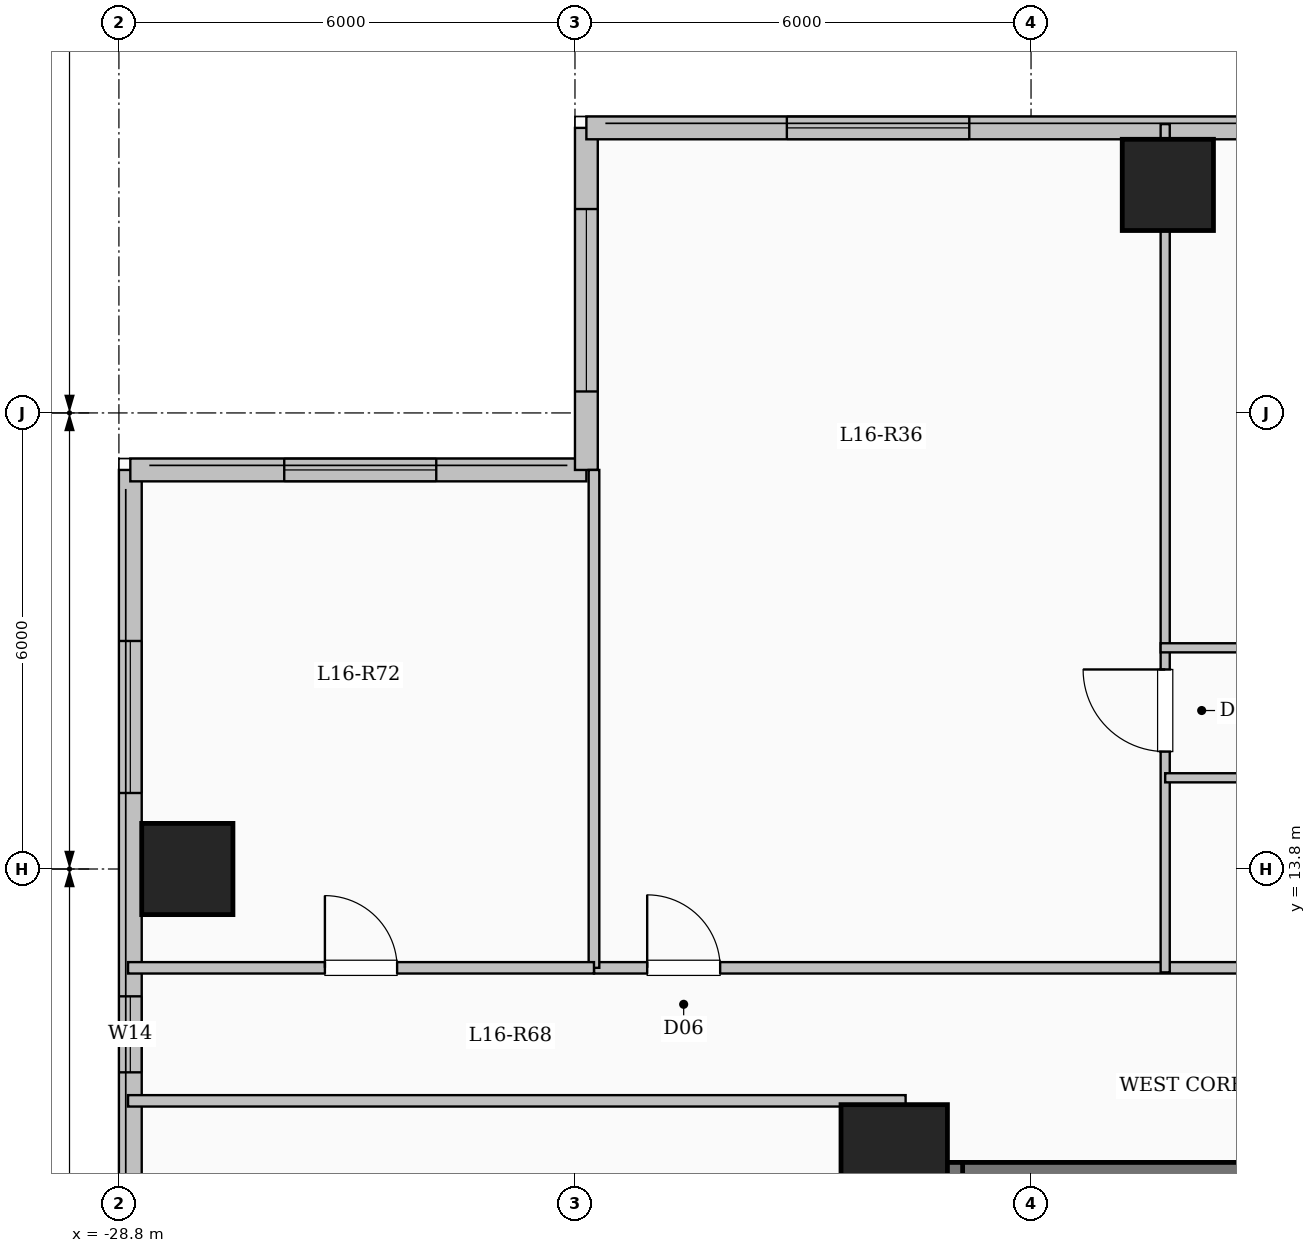
"""IFC4 building model, lengths in metres.
Left out: names, types, materials, properties, quantities, classifications, styles, units other than length and angle.
Written with IfcOpenShell. Run it as: python <this file> out.ifc"""

import sys

from ifc_helpers import new_model, si_unit, direction, frame, frame_2d, origin, origin_2d, place, context, subcontext, project, spatial, rectangle, extrude, element, fill, save


model = new_model("IFC4")
c1 = context("Model", 3, precision=1e-05, world=origin(), true_north=direction((0.0, 1.0)))
c2 = subcontext(c1, "Body", "Model", "MODEL_VIEW")
j1 = project(units=[si_unit("LENGTHUNIT", "METRE"), si_unit("PLANEANGLEUNIT", "RADIAN")], contexts=[c1])
p1 = place(None, origin())
s1 = spatial("IfcSite", under=j1, at=p1, CompositionType="ELEMENT")
p2 = place(p1, origin())
s2 = spatial("IfcBuilding", under=s1, at=p2, CompositionType="ELEMENT")
p3 = place(p2, frame((0.0, 0.0, 60.85)))
s3 = spatial("IfcBuildingStorey", under=s2, at=p3, CompositionType="ELEMENT", Elevation=60.85)
p4 = place(p3, frame((-18.6, 10.0, 0.0), z_axis=(0.0, 0.0, 1.0), x_axis=(1.0, 0.0, 0.0)))
e1 = element("IfcColumn", 1, at=p4, inside=s3, PredefinedType="COLUMN", context=c2, shape_type="SweptSolid", body=[
    extrude(rectangle(XDim=1.4, YDim=1.4, at=origin_2d()), origin(), (0.0, 0.0, 1.0), 3.35),
])
for number, where, z_axis, x_axis in (
    (2, (-15.0, 22.8, 0.0), (0.0, 0.0, 1.0), (1.0, 0.0, 0.0)),
    (3, (-27.9, 13.8, 0.0), (0.0, 0.0, 1.0), (1.0, 0.0, 0.0)),
):
    element("IfcColumn", number, at=place(p3, frame(where, z_axis=z_axis, x_axis=x_axis)), inside=s3, PredefinedType="COLUMN", context=c2, shape_type="SweptSolid", body=[
        extrude(rectangle(XDim=1.2, YDim=1.2, at=origin_2d()), origin(), (0.0, 0.0, 1.0), 3.35),
    ])
p5 = place(p3, frame((-28.65, -19.05, 0.0), z_axis=(0.0, 0.0, 1.0), x_axis=(0.0, 1.0, 0.0)))
e4 = element("IfcWall", 4, at=p5, inside=s3, PredefinedType="SOLIDWALL", context=c2, shape_type="SweptSolid", body=[
    extrude(rectangle(XDim=38.1, YDim=0.3, at=frame_2d((19.05, 0.0))), origin(), (0.0, 0.0, 1.0), 3.05),
])
p6 = place(p5, frame((3.15, 0.0, 0.9)))
e5 = element("IfcOpeningElement", 5, at=p6, cuts=e4, PredefinedType="OPENING", context=c2, shape_type="SweptSolid", body=[
    extrude(rectangle(XDim=2.4, YDim=1.8, at=frame_2d((1.2, 0.9))), frame((0.0, 0.16, 0.0), z_axis=(0.0, -1.0, 0.0), x_axis=(1.0, 0.0, 0.0)), (0.0, 0.0, 1.0), 0.32),
])
p7 = place(p5, frame((9.542, 0.0, 0.9)))
e6 = element("IfcOpeningElement", 6, at=p7, cuts=e4, PredefinedType="OPENING", context=c2, shape_type="SweptSolid", body=[
    extrude(rectangle(XDim=1.5, YDim=1.65, at=frame_2d((0.75, 0.825))), frame((0.0, 0.16, 0.0), z_axis=(0.0, -1.0, 0.0), x_axis=(1.0, 0.0, 0.0)), (0.0, 0.0, 1.0), 0.32),
])
p8 = place(p5, frame((19.8, 0.0, 0.9)))
e7 = element("IfcOpeningElement", 7, at=p8, cuts=e4, PredefinedType="OPENING", context=c2, shape_type="SweptSolid", body=[
    extrude(rectangle(XDim=2.0, YDim=1.7, at=frame_2d((1.0, 0.85))), frame((0.0, 0.16, 0.0), z_axis=(0.0, -1.0, 0.0), x_axis=(1.0, 0.0, 0.0)), (0.0, 0.0, 1.0), 0.32),
])
p9 = place(p5, frame((30.175, 0.0, 0.95)))
e8 = element("IfcOpeningElement", 8, at=p9, cuts=e4, PredefinedType="OPENING", context=c2, shape_type="SweptSolid", body=[
    extrude(rectangle(XDim=1.0, YDim=1.5, at=frame_2d((0.5, 0.75))), frame((0.0, 0.16, 0.0), z_axis=(0.0, -1.0, 0.0), x_axis=(1.0, 0.0, 0.0)), (0.0, 0.0, 1.0), 0.32),
])
p10 = place(p5, frame((33.85, 0.0, 0.9)))
e9 = element("IfcOpeningElement", 9, at=p10, cuts=e4, PredefinedType="OPENING", context=c2, shape_type="SweptSolid", body=[
    extrude(rectangle(XDim=2.0, YDim=1.7, at=frame_2d((1.0, 0.85))), frame((0.0, 0.16, 0.0), z_axis=(0.0, -1.0, 0.0), x_axis=(1.0, 0.0, 0.0)), (0.0, 0.0, 1.0), 0.32),
])
p11 = place(p3, frame((-28.65, 19.05, 0.0), z_axis=(0.0, 0.0, 1.0), x_axis=(1.0, 0.0, 0.0)))
e10 = element("IfcWall", 10, at=p11, inside=s3, PredefinedType="SOLIDWALL", context=c2, shape_type="SweptSolid", body=[
    extrude(rectangle(XDim=6.0, YDim=0.3, at=frame_2d((3.0, 0.0))), origin(), (0.0, 0.0, 1.0), 3.05),
])
p12 = place(p11, frame((2.025, 0.0, 0.9)))
e11 = element("IfcOpeningElement", 11, at=p12, cuts=e10, PredefinedType="OPENING", context=c2, shape_type="SweptSolid", body=[
    extrude(rectangle(XDim=2.0, YDim=1.7, at=frame_2d((1.0, 0.85))), frame((0.0, 0.16, 0.0), z_axis=(0.0, -1.0, 0.0), x_axis=(1.0, 0.0, 0.0)), (0.0, 0.0, 1.0), 0.32),
])
p13 = place(p3, frame((-22.65, 19.05, 0.0), z_axis=(0.0, 0.0, 1.0), x_axis=(0.0, 1.0, 0.0)))
e12 = element("IfcWall", 12, at=p13, inside=s3, PredefinedType="SOLIDWALL", context=c2, shape_type="SweptSolid", body=[
    extrude(rectangle(XDim=4.5, YDim=0.3, at=frame_2d((2.25, 0.0))), origin(), (0.0, 0.0, 1.0), 3.05),
])
p14 = place(p13, frame((1.032, 0.0, 0.9)))
e13 = element("IfcOpeningElement", 13, at=p14, cuts=e12, PredefinedType="OPENING", context=c2, shape_type="SweptSolid", body=[
    extrude(rectangle(XDim=2.4, YDim=1.8, at=frame_2d((1.2, 0.9))), frame((0.0, 0.16, 0.0), z_axis=(0.0, -1.0, 0.0), x_axis=(1.0, 0.0, 0.0)), (0.0, 0.0, 1.0), 0.32),
])
p15 = place(p3, frame((-22.65, 23.55, 0.0), z_axis=(0.0, 0.0, 1.0), x_axis=(1.0, 0.0, 0.0)))
e14 = element("IfcWall", 14, at=p15, inside=s3, PredefinedType="SOLIDWALL", context=c2, shape_type="SweptSolid", body=[
    extrude(rectangle(XDim=15.3, YDim=0.3, at=frame_2d((7.65, 0.0))), origin(), (0.0, 0.0, 1.0), 3.05),
])
p16 = place(p15, frame((2.637, 0.0, 0.9)))
e15 = element("IfcOpeningElement", 15, at=p16, cuts=e14, PredefinedType="OPENING", context=c2, shape_type="SweptSolid", body=[
    extrude(rectangle(XDim=2.4, YDim=1.8, at=frame_2d((1.2, 0.9))), frame((0.0, 0.16, 0.0), z_axis=(0.0, -1.0, 0.0), x_axis=(1.0, 0.0, 0.0)), (0.0, 0.0, 1.0), 0.32),
])
p17 = place(p15, frame((8.656, 0.0, 0.9)))
e16 = element("IfcOpeningElement", 16, at=p17, cuts=e14, PredefinedType="OPENING", context=c2, shape_type="SweptSolid", body=[
    extrude(rectangle(XDim=1.8, YDim=1.65, at=frame_2d((0.9, 0.825))), frame((0.0, 0.16, 0.0), z_axis=(0.0, -1.0, 0.0), x_axis=(1.0, 0.0, 0.0)), (0.0, 0.0, 1.0), 0.32),
])
p18 = place(p15, frame((12.544, 0.0, 0.9)))
e17 = element("IfcOpeningElement", 17, at=p18, cuts=e14, PredefinedType="OPENING", context=c2, shape_type="SweptSolid", body=[
    extrude(rectangle(XDim=1.8, YDim=1.65, at=frame_2d((0.9, 0.825))), frame((0.0, 0.16, 0.0), z_axis=(0.0, -1.0, 0.0), x_axis=(1.0, 0.0, 0.0)), (0.0, 0.0, 1.0), 0.32),
])
p19 = place(p3, frame((-18.0, 9.79, 0.0), z_axis=(0.0, 0.0, 1.0), x_axis=(1.0, 0.0, 0.0)))
e18 = element("IfcWall", 18, at=p19, inside=s3, PredefinedType="SHEAR", context=c2, shape_type="SweptSolid", body=[
    extrude(rectangle(XDim=8.0, YDim=0.3, at=frame_2d((4.0, 0.0))), origin(), (0.0, 0.0, 1.0), 3.35),
])
p20 = place(p3, frame((-17.85, 6.35, 0.0), z_axis=(0.0, 0.0, 1.0), x_axis=(0.0, 1.0, 0.0)))
e19 = element("IfcWall", 19, at=p20, inside=s3, PredefinedType="SHEAR", context=c2, shape_type="SweptSolid", body=[
    extrude(rectangle(XDim=3.59, YDim=0.3, at=frame_2d((1.795, 0.0))), origin(), (0.0, 0.0, 1.0), 3.35),
])
p21 = place(p3, frame((-22.55, 12.5, 0.0), z_axis=(0.0, 0.0, 1.0), x_axis=(1.0, 0.0, 0.0)))
e20 = element("IfcWall", 20, at=p21, inside=s3, PredefinedType="PARTITIONING", context=c2, shape_type="SweptSolid", body=[
    extrude(rectangle(XDim=18.7, YDim=0.15, at=frame_2d((9.35, 0.0))), origin(), (0.0, 0.0, 1.0), 3.05),
])
p22 = place(p21, frame((0.7, 0.0, 0.0)))
e21 = element("IfcOpeningElement", 21, at=p22, cuts=e20, PredefinedType="OPENING", context=c2, shape_type="SweptSolid", body=[
    extrude(rectangle(XDim=0.96, YDim=2.15, at=frame_2d((0.48, 1.075))), frame((0.0, 0.085, 0.0), z_axis=(0.0, -1.0, 0.0), x_axis=(1.0, 0.0, 0.0)), (0.0, 0.0, 1.0), 0.17),
])
p23 = place(p3, frame((-15.035, 12.44, 0.0), z_axis=(0.0, 0.0, 1.0), x_axis=(0.0, 1.0, 0.0)))
e22 = element("IfcWall", 22, at=p23, inside=s3, PredefinedType="PARTITIONING", context=c2, shape_type="SweptSolid", body=[
    extrude(rectangle(XDim=11.16, YDim=0.12, at=frame_2d((5.58, 0.0))), origin(), (0.0, 0.0, 1.0), 2.385),
])
p24 = place(p23, frame((2.905, 0.0, 0.0)))
e23 = element("IfcOpeningElement", 23, at=p24, cuts=e22, PredefinedType="OPENING", context=c2, shape_type="SweptSolid", body=[
    extrude(rectangle(XDim=1.08, YDim=2.15, at=frame_2d((0.54, 1.075))), frame((0.0, 0.07, 0.0), z_axis=(0.0, -1.0, 0.0), x_axis=(1.0, 0.0, 0.0)), (0.0, 0.0, 1.0), 0.14),
])
p25 = place(p3, frame((-15.035, 15.0, 0.0), z_axis=(0.0, 0.0, 1.0), x_axis=(1.0, 0.0, 0.0)))
e24 = element("IfcWall", 24, at=p25, inside=s3, PredefinedType="PARTITIONING", context=c2, shape_type="SweptSolid", body=[
    extrude(rectangle(XDim=8.228, YDim=0.12, at=frame_2d((4.114, 0.0))), origin(), (0.0, 0.0, 1.0), 2.535),
])
p26 = place(p25, frame((3.674, 0.0, 0.0)))
e25 = element("IfcOpeningElement", 25, at=p26, cuts=e24, PredefinedType="OPENING", context=c2, shape_type="SweptSolid", body=[
    extrude(rectangle(XDim=0.88, YDim=2.1, at=frame_2d((0.44, 1.05))), frame((0.0, 0.07, 0.0), z_axis=(0.0, -1.0, 0.0), x_axis=(1.0, 0.0, 0.0)), (0.0, 0.0, 1.0), 0.14),
])
p27 = place(p3, frame((-15.095, 16.71, 0.0), z_axis=(0.0, 0.0, 1.0), x_axis=(1.0, 0.0, 0.0)))
e26 = element("IfcWall", 26, at=p27, inside=s3, PredefinedType="PARTITIONING", context=c2, shape_type="SweptSolid", body=[
    extrude(rectangle(XDim=15.705, YDim=0.12, at=frame_2d((7.853, 0.0))), origin(), (0.0, 0.0, 1.0), 2.535),
])
p28 = place(p27, frame((1.501, 0.0, 0.0)))
e27 = element("IfcOpeningElement", 27, at=p28, cuts=e26, PredefinedType="OPENING", context=c2, shape_type="SweptSolid", body=[
    extrude(rectangle(XDim=0.88, YDim=2.1, at=frame_2d((0.44, 1.05))), frame((0.0, 0.07, 0.0), z_axis=(0.0, -1.0, 0.0), x_axis=(1.0, 0.0, 0.0)), (0.0, 0.0, 1.0), 0.14),
])
p29 = place(p27, frame((5.382, 0.0, 0.0)))
e28 = element("IfcOpeningElement", 28, at=p29, cuts=e26, PredefinedType="OPENING", context=c2, shape_type="SweptSolid", body=[
    extrude(rectangle(XDim=0.88, YDim=2.1, at=frame_2d((0.44, 1.05))), frame((0.0, 0.07, 0.0), z_axis=(0.0, -1.0, 0.0), x_axis=(1.0, 0.0, 0.0)), (0.0, 0.0, 1.0), 0.14),
])
p30 = place(p27, frame((9.263, 0.0, 0.0)))
e29 = element("IfcOpeningElement", 29, at=p30, cuts=e26, PredefinedType="OPENING", context=c2, shape_type="SweptSolid", body=[
    extrude(rectangle(XDim=0.88, YDim=2.1, at=frame_2d((0.44, 1.05))), frame((0.0, 0.07, 0.0), z_axis=(0.0, -1.0, 0.0), x_axis=(1.0, 0.0, 0.0)), (0.0, 0.0, 1.0), 0.14),
])
p31 = place(p27, frame((13.144, 0.0, 0.0)))
e30 = element("IfcOpeningElement", 30, at=p31, cuts=e26, PredefinedType="OPENING", context=c2, shape_type="SweptSolid", body=[
    extrude(rectangle(XDim=0.88, YDim=2.1, at=frame_2d((0.44, 1.05))), frame((0.0, 0.07, 0.0), z_axis=(0.0, -1.0, 0.0), x_axis=(1.0, 0.0, 0.0)), (0.0, 0.0, 1.0), 0.14),
])
p32 = place(p3, frame((-28.68, 10.75, 0.0), z_axis=(0.0, 0.0, 1.0), x_axis=(1.0, 0.0, 0.0)))
e31 = element("IfcWall", 31, at=p32, inside=s3, PredefinedType="PARTITIONING", context=c2, shape_type="SweptSolid", body=[
    extrude(rectangle(XDim=10.23, YDim=0.15, at=frame_2d((5.115, 0.0))), origin(), (0.0, 0.0, 1.0), 3.05),
])
p33 = place(p3, frame((-22.55, 12.5, 0.0), z_axis=(0.0, 0.0, 1.0), x_axis=(0.0, 1.0, 0.0)))
e32 = element("IfcWall", 32, at=p33, inside=s3, PredefinedType="PARTITIONING", context=c2, shape_type="SweptSolid", body=[
    extrude(rectangle(XDim=6.55, YDim=0.14, at=frame_2d((3.275, 0.0))), origin(), (0.0, 0.0, 1.0), 3.05),
])
p34 = place(p3, frame((-28.68, 12.5, 0.0), z_axis=(0.0, 0.0, 1.0), x_axis=(1.0, 0.0, 0.0)))
e33 = element("IfcWall", 33, at=p34, inside=s3, PredefinedType="PARTITIONING", context=c2, shape_type="SweptSolid", body=[
    extrude(rectangle(XDim=6.13, YDim=0.15, at=frame_2d((3.065, 0.0))), origin(), (0.0, 0.0, 1.0), 3.05),
])
p35 = place(p34, frame((2.59, 0.0, 0.0)))
e34 = element("IfcOpeningElement", 34, at=p35, cuts=e33, PredefinedType="OPENING", context=c2, shape_type="SweptSolid", body=[
    extrude(rectangle(XDim=0.95, YDim=2.15, at=frame_2d((0.475, 1.075))), frame((0.0, 0.085, 0.0), z_axis=(0.0, -1.0, 0.0), x_axis=(1.0, 0.0, 0.0)), (0.0, 0.0, 1.0), 0.17),
])
p36 = place(p9, origin())
e35 = element("IfcWindow", 35, at=p36, inside=s3, PartitioningType="SINGLE_PANEL", PredefinedType="WINDOW", context=c2, shape_type="SweptSolid", body=[
    extrude(rectangle(XDim=1.0, YDim=1.5, at=frame_2d((0.5, 0.75))), frame((0.0, 0.03, 0.0), z_axis=(0.0, -1.0, 0.0), x_axis=(1.0, 0.0, 0.0)), (0.0, 0.0, 1.0), 0.06),
])
fill(e8, e35)
p37 = place(p10, origin())
e36 = element("IfcWindow", 36, at=p37, inside=s3, PartitioningType="SINGLE_PANEL", PredefinedType="WINDOW", context=c2, shape_type="SweptSolid", body=[
    extrude(rectangle(XDim=2.0, YDim=1.7, at=frame_2d((1.0, 0.85))), frame((0.0, 0.03, 0.0), z_axis=(0.0, -1.0, 0.0), x_axis=(1.0, 0.0, 0.0)), (0.0, 0.0, 1.0), 0.06),
])
fill(e9, e36)
p38 = place(p12, origin())
e37 = element("IfcWindow", 37, at=p38, inside=s3, PartitioningType="SINGLE_PANEL", PredefinedType="WINDOW", context=c2, shape_type="SweptSolid", body=[
    extrude(rectangle(XDim=2.0, YDim=1.7, at=frame_2d((1.0, 0.85))), frame((0.0, 0.03, 0.0), z_axis=(0.0, -1.0, 0.0), x_axis=(1.0, 0.0, 0.0)), (0.0, 0.0, 1.0), 0.06),
])
fill(e11, e37)
p39 = place(p14, origin())
e38 = element("IfcWindow", 38, at=p39, inside=s3, PartitioningType="SINGLE_PANEL", PredefinedType="WINDOW", context=c2, shape_type="SweptSolid", body=[
    extrude(rectangle(XDim=2.4, YDim=1.8, at=frame_2d((1.2, 0.9))), frame((0.0, 0.03, 0.0), z_axis=(0.0, -1.0, 0.0), x_axis=(1.0, 0.0, 0.0)), (0.0, 0.0, 1.0), 0.06),
])
fill(e13, e38)
p40 = place(p16, origin())
e39 = element("IfcWindow", 39, at=p40, inside=s3, PartitioningType="SINGLE_PANEL", PredefinedType="WINDOW", context=c2, shape_type="SweptSolid", body=[
    extrude(rectangle(XDim=2.4, YDim=1.8, at=frame_2d((1.2, 0.9))), frame((0.0, 0.03, 0.0), z_axis=(0.0, -1.0, 0.0), x_axis=(1.0, 0.0, 0.0)), (0.0, 0.0, 1.0), 0.06),
])
fill(e15, e39)
p41 = place(p22, origin())
e40 = element("IfcDoor", 40, at=p41, inside=s3, OperationType="SINGLE_SWING_LEFT", PredefinedType="DOOR", context=c2, shape_type="SweptSolid", body=[
    extrude(rectangle(XDim=0.96, YDim=2.15, at=frame_2d((0.48, 1.075))), frame((0.0, 0.025, 0.0), z_axis=(0.0, -1.0, 0.0), x_axis=(1.0, 0.0, 0.0)), (0.0, 0.0, 1.0), 0.05),
])
fill(e21, e40)
p42 = place(p24, origin())
e41 = element("IfcDoor", 41, at=p42, inside=s3, OperationType="SINGLE_SWING_RIGHT", PredefinedType="DOOR", context=c2, shape_type="SweptSolid", body=[
    extrude(rectangle(XDim=1.08, YDim=2.15, at=frame_2d((0.54, 1.075))), frame((0.0, 0.025, 0.0), z_axis=(0.0, -1.0, 0.0), x_axis=(1.0, 0.0, 0.0)), (0.0, 0.0, 1.0), 0.05),
])
fill(e23, e41)
p43 = place(p35, origin())
e42 = element("IfcDoor", 42, at=p43, inside=s3, OperationType="SINGLE_SWING_LEFT", PredefinedType="DOOR", context=c2, shape_type="SweptSolid", body=[
    extrude(rectangle(XDim=0.95, YDim=2.15, at=frame_2d((0.475, 1.075))), frame((0.0, 0.025, 0.0), z_axis=(0.0, -1.0, 0.0), x_axis=(1.0, 0.0, 0.0)), (0.0, 0.0, 1.0), 0.05),
])
fill(e34, e42)
save(model, sys.argv[1])
